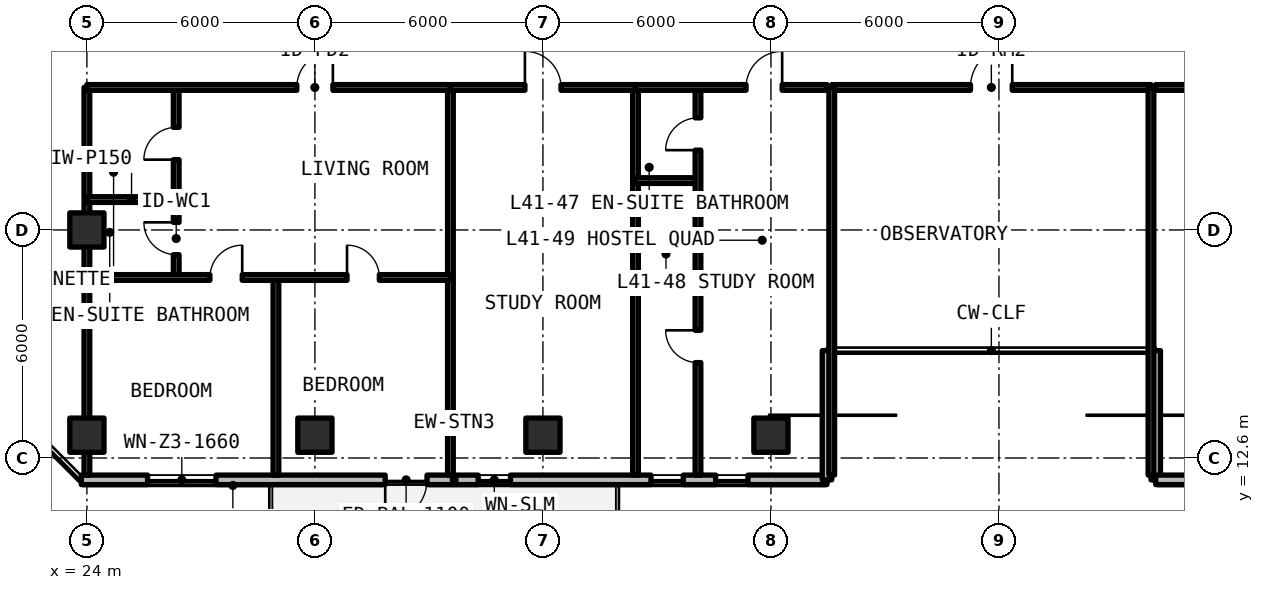
"""IFC4 building model, lengths in metres.
Left out: names, types, materials, properties, quantities, classifications, styles, units other than length and angle.
Written with IfcOpenShell. Run it as: python <this file> out.ifc"""

import sys

from ifc_helpers import new_model, si_unit, direction, frame, frame_2d, origin, origin_2d, place, context, subcontext, project, spatial, rectangle, extrude, element, fill, save


model = new_model("IFC4")
c1 = context("Model", 3, precision=1e-05, world=origin(), true_north=direction((0.0, 1.0)))
c2 = subcontext(c1, "Body", "Model", "MODEL_VIEW")
j1 = project(units=[si_unit("LENGTHUNIT", "METRE"), si_unit("PLANEANGLEUNIT", "RADIAN")], contexts=[c1])
p1 = place(None, origin())
s1 = spatial("IfcSite", under=j1, at=p1, CompositionType="ELEMENT")
p2 = place(p1, origin())
s2 = spatial("IfcBuilding", under=s1, at=p2, CompositionType="ELEMENT")
p3 = place(p2, frame((0.0, 0.0, 148.5)))
s3 = spatial("IfcBuildingStorey", under=s2, at=p3, CompositionType="ELEMENT", Elevation=148.5)
for number, where, z_axis, x_axis in (
    (1, (24.0, 18.6, 0.0), (0.0, 0.0, 1.0), (1.0, 0.0, 0.0)),
    (2, (24.0, 13.2, 0.0), (0.0, 0.0, 1.0), (1.0, 0.0, 0.0)),
    (3, (30.0, 13.2, 0.0), (0.0, 0.0, 1.0), (1.0, 0.0, 0.0)),
    (4, (36.0, 13.2, 0.0), (0.0, 0.0, 1.0), (1.0, 0.0, 0.0)),
    (5, (42.0, 13.2, 0.0), (0.0, 0.0, 1.0), (1.0, 0.0, 0.0)),
):
    element("IfcColumn", number, at=place(p3, frame(where, z_axis=z_axis, x_axis=x_axis)), inside=s3, PredefinedType="COLUMN", context=c2, shape_type="SweptSolid", body=[
        extrude(rectangle(XDim=0.9, YDim=0.9, at=origin_2d()), origin(), (0.0, 0.0, 1.0), 3.3),
    ])
p4 = place(p3, frame((23.852, 12.025, 0.0), z_axis=(0.0, 0.0, 1.0), x_axis=(1.0, 0.0, 0.0)))
e6 = element("IfcWall", 6, at=p4, inside=s3, PredefinedType="SOLIDWALL", context=c2, shape_type="SweptSolid", body=[
    extrude(rectangle(XDim=19.623, YDim=0.25, at=frame_2d((9.812, 0.0))), origin(), (0.0, 0.0, 1.0), 3.08),
])
p5 = place(p4, frame((7.998, 0.0, 0.0)))
e7 = element("IfcOpeningElement", 7, at=p5, cuts=e6, PredefinedType="OPENING", context=c2, shape_type="SweptSolid", body=[
    extrude(rectangle(XDim=1.1, YDim=2.15, at=frame_2d((0.55, 1.075))), frame((0.0, 0.135, 0.0), z_axis=(0.0, -1.0, 0.0), x_axis=(1.0, 0.0, 0.0)), (0.0, 0.0, 1.0), 0.27),
])
p6 = place(p4, frame((1.745, 0.0, 0.78)))
e8 = element("IfcOpeningElement", 8, at=p6, cuts=e6, PredefinedType="OPENING", context=c2, shape_type="SweptSolid", body=[
    extrude(rectangle(XDim=1.8, YDim=1.66, at=frame_2d((0.9, 0.83))), frame((0.0, 0.135, 0.0), z_axis=(0.0, -1.0, 0.0), x_axis=(1.0, 0.0, 0.0)), (0.0, 0.0, 1.0), 0.27),
])
p7 = place(p4, frame((10.444, 0.0, 0.78)))
e9 = element("IfcOpeningElement", 9, at=p7, cuts=e6, PredefinedType="OPENING", context=c2, shape_type="SweptSolid", body=[
    extrude(rectangle(XDim=0.85, YDim=1.65, at=frame_2d((0.425, 0.825))), frame((0.0, 0.135, 0.0), z_axis=(0.0, -1.0, 0.0), x_axis=(1.0, 0.0, 0.0)), (0.0, 0.0, 1.0), 0.27),
])
p8 = place(p4, frame((14.991, 0.0, 0.78)))
e10 = element("IfcOpeningElement", 10, at=p8, cuts=e6, PredefinedType="OPENING", context=c2, shape_type="SweptSolid", body=[
    extrude(rectangle(XDim=0.85, YDim=1.65, at=frame_2d((0.425, 0.825))), frame((0.0, 0.135, 0.0), z_axis=(0.0, -1.0, 0.0), x_axis=(1.0, 0.0, 0.0)), (0.0, 0.0, 1.0), 0.27),
])
p9 = place(p4, frame((16.693, 0.0, 0.78)))
e11 = element("IfcOpeningElement", 11, at=p9, cuts=e6, PredefinedType="OPENING", context=c2, shape_type="SweptSolid", body=[
    extrude(rectangle(XDim=0.85, YDim=1.65, at=frame_2d((0.425, 0.825))), frame((0.0, 0.135, 0.0), z_axis=(0.0, -1.0, 0.0), x_axis=(1.0, 0.0, 0.0)), (0.0, 0.0, 1.0), 0.27),
])
for number, where, z_axis, x_axis in (
    (12, (43.475, 12.025, 0.0), (0.0, 0.0, 1.0), (0.0, 1.0, 0.0)),
    (13, (52.125, 15.425, 0.0), (0.0, 0.0, 1.0), (0.0, -1.0, 0.0)),
):
    element("IfcWall", number, at=place(p3, frame(where, z_axis=z_axis, x_axis=x_axis)), inside=s3, PredefinedType="SOLIDWALL", context=c2, shape_type="SweptSolid", body=[
        extrude(rectangle(XDim=3.4, YDim=0.25, at=frame_2d((1.7, 0.0))), origin(), (0.0, 0.0, 1.0), 3.08),
    ])
p10 = place(p3, frame((52.125, 12.025, 0.0), z_axis=(0.0, 0.0, 1.0), x_axis=(1.0, 0.0, 0.0)))
e14 = element("IfcWall", 14, at=p10, inside=s3, PredefinedType="SOLIDWALL", context=c2, shape_type="SweptSolid", body=[
    extrude(rectangle(XDim=43.623, YDim=0.25, at=frame_2d((21.812, 0.0))), origin(), (0.0, 0.0, 1.0), 3.08),
])
p11 = place(p10, frame((15.775, 0.0, 0.0)))
e15 = element("IfcOpeningElement", 15, at=p11, cuts=e14, PredefinedType="OPENING", context=c2, shape_type="SweptSolid", body=[
    extrude(rectangle(XDim=1.1, YDim=2.15, at=frame_2d((0.55, 1.075))), frame((0.0, 0.135, 0.0), z_axis=(0.0, -1.0, 0.0), x_axis=(1.0, 0.0, 0.0)), (0.0, 0.0, 1.0), 0.27),
])
p12 = place(p10, frame((27.625, 0.0, 0.0)))
e16 = element("IfcOpeningElement", 16, at=p12, cuts=e14, PredefinedType="OPENING", context=c2, shape_type="SweptSolid", body=[
    extrude(rectangle(XDim=1.1, YDim=2.15, at=frame_2d((0.55, 1.075))), frame((0.0, 0.135, 0.0), z_axis=(0.0, -1.0, 0.0), x_axis=(1.0, 0.0, 0.0)), (0.0, 0.0, 1.0), 0.27),
])
p13 = place(p10, frame((2.669, 0.0, 0.78)))
e17 = element("IfcOpeningElement", 17, at=p13, cuts=e14, PredefinedType="OPENING", context=c2, shape_type="SweptSolid", body=[
    extrude(rectangle(XDim=1.8, YDim=1.66, at=frame_2d((0.9, 0.83))), frame((0.0, 0.135, 0.0), z_axis=(0.0, -1.0, 0.0), x_axis=(1.0, 0.0, 0.0)), (0.0, 0.0, 1.0), 0.27),
])
p14 = place(p10, frame((9.659, 0.0, 0.78)))
e18 = element("IfcOpeningElement", 18, at=p14, cuts=e14, PredefinedType="OPENING", context=c2, shape_type="SweptSolid", body=[
    extrude(rectangle(XDim=1.8, YDim=1.66, at=frame_2d((0.9, 0.83))), frame((0.0, 0.135, 0.0), z_axis=(0.0, -1.0, 0.0), x_axis=(1.0, 0.0, 0.0)), (0.0, 0.0, 1.0), 0.27),
])
p15 = place(p10, frame((32.888, 0.0, 0.78)))
e19 = element("IfcOpeningElement", 19, at=p15, cuts=e14, PredefinedType="OPENING", context=c2, shape_type="SweptSolid", body=[
    extrude(rectangle(XDim=1.8, YDim=1.66, at=frame_2d((0.9, 0.83))), frame((0.0, 0.135, 0.0), z_axis=(0.0, -1.0, 0.0), x_axis=(1.0, 0.0, 0.0)), (0.0, 0.0, 1.0), 0.27),
])
p16 = place(p10, frame((39.42, 0.0, 0.78)))
e20 = element("IfcOpeningElement", 20, at=p16, cuts=e14, PredefinedType="OPENING", context=c2, shape_type="SweptSolid", body=[
    extrude(rectangle(XDim=1.8, YDim=1.66, at=frame_2d((0.9, 0.83))), frame((0.0, 0.135, 0.0), z_axis=(0.0, -1.0, 0.0), x_axis=(1.0, 0.0, 0.0)), (0.0, 0.0, 1.0), 0.27),
])
p17 = place(p3, frame((43.6, 22.35, 0.0), z_axis=(0.0, 0.0, 1.0), x_axis=(1.0, 0.0, 0.0)))
e21 = element("IfcWall", 21, at=p17, inside=s3, PredefinedType="SOLIDWALL", context=c2, shape_type="SweptSolid", body=[
    extrude(rectangle(XDim=8.4, YDim=0.15, at=frame_2d((4.2, 0.0))), origin(), (0.0, 0.0, 1.0), 2.35),
])
p18 = place(p17, frame((3.65, 0.0, 0.0)))
e22 = element("IfcOpeningElement", 22, at=p18, cuts=e21, PredefinedType="OPENING", context=c2, shape_type="SweptSolid", body=[
    extrude(rectangle(XDim=1.1, YDim=2.15, at=frame_2d((0.55, 1.075))), frame((0.0, 0.085, 0.0), z_axis=(0.0, -1.0, 0.0), x_axis=(1.0, 0.0, 0.0)), (0.0, 0.0, 1.0), 0.17),
])
for number, where, z_axis, x_axis in (
    (23, (43.6, 12.15, 0.0), (0.0, 0.0, 1.0), (0.0, 1.0, 0.0)),
    (24, (52.0, 12.15, 0.0), (0.0, 0.0, 1.0), (0.0, 1.0, 0.0)),
    (25, (24.0, 12.15, 0.0), (0.0, 0.0, 1.0), (0.0, 1.0, 0.0)),
    (26, (33.566, 12.15, 0.0), (0.0, 0.0, 1.0), (0.0, 1.0, 0.0)),
):
    element("IfcWall", number, at=place(p3, frame(where, z_axis=z_axis, x_axis=x_axis)), inside=s3, PredefinedType="SOLIDWALL", context=c2, shape_type="SweptSolid", body=[
        extrude(rectangle(XDim=10.2, YDim=0.15, at=frame_2d((5.1, 0.0))), origin(), (0.0, 0.0, 1.0), 2.35),
    ])
p19 = place(p3, frame((24.0, 19.4, 0.0), z_axis=(0.0, 0.0, 1.0), x_axis=(1.0, 0.0, 0.0)))
e27 = element("IfcWall", 27, at=p19, inside=s3, PredefinedType="PARTITIONING", context=c2, shape_type="SweptSolid", body=[
    extrude(rectangle(XDim=2.35, YDim=0.15, at=frame_2d((1.175, 0.0))), origin(), (0.0, 0.0, 1.0), 2.35),
])
p20 = place(p3, frame((26.35, 17.35, 0.0), z_axis=(0.0, 0.0, 1.0), x_axis=(0.0, 1.0, 0.0)))
e28 = element("IfcWall", 28, at=p20, inside=s3, PredefinedType="PARTITIONING", context=c2, shape_type="SweptSolid", body=[
    extrude(rectangle(XDim=5.0, YDim=0.15, at=frame_2d((2.5, 0.0))), origin(), (0.0, 0.0, 1.0), 2.35),
])
p21 = place(p20, frame((0.6, 0.0, 0.0)))
e29 = element("IfcOpeningElement", 29, at=p21, cuts=e28, PredefinedType="OPENING", context=c2, shape_type="SweptSolid", body=[
    extrude(rectangle(XDim=0.85, YDim=2.1, at=frame_2d((0.425, 1.05))), frame((0.0, 0.085, 0.0), z_axis=(0.0, -1.0, 0.0), x_axis=(1.0, 0.0, 0.0)), (0.0, 0.0, 1.0), 0.17),
])
p22 = place(p20, frame((3.1, 0.0, 0.0)))
e30 = element("IfcOpeningElement", 30, at=p22, cuts=e28, PredefinedType="OPENING", context=c2, shape_type="SweptSolid", body=[
    extrude(rectangle(XDim=0.85, YDim=2.1, at=frame_2d((0.425, 1.05))), frame((0.0, 0.085, 0.0), z_axis=(0.0, -1.0, 0.0), x_axis=(1.0, 0.0, 0.0)), (0.0, 0.0, 1.0), 0.17),
])
p23 = place(p3, frame((28.974, 12.15, 0.0), z_axis=(0.0, 0.0, 1.0), x_axis=(0.0, 1.0, 0.0)))
e31 = element("IfcWall", 31, at=p23, inside=s3, PredefinedType="PARTITIONING", context=c2, shape_type="SweptSolid", body=[
    extrude(rectangle(XDim=5.2, YDim=0.15, at=frame_2d((2.6, 0.0))), origin(), (0.0, 0.0, 1.0), 2.35),
])
p24 = place(p3, frame((24.0, 17.35, 0.0), z_axis=(0.0, 0.0, 1.0), x_axis=(1.0, 0.0, 0.0)))
e32 = element("IfcWall", 32, at=p24, inside=s3, PredefinedType="PARTITIONING", context=c2, shape_type="SweptSolid", body=[
    extrude(rectangle(XDim=9.566, YDim=0.15, at=frame_2d((4.783, 0.0))), origin(), (0.0, 0.0, 1.0), 2.35),
])
p25 = place(p24, frame((3.237, 0.0, 0.0)))
e33 = element("IfcOpeningElement", 33, at=p25, cuts=e32, PredefinedType="OPENING", context=c2, shape_type="SweptSolid", body=[
    extrude(rectangle(XDim=0.85, YDim=2.1, at=frame_2d((0.425, 1.05))), frame((0.0, 0.085, 0.0), z_axis=(0.0, -1.0, 0.0), x_axis=(1.0, 0.0, 0.0)), (0.0, 0.0, 1.0), 0.17),
])
p26 = place(p24, frame((6.845, 0.0, 0.0)))
e34 = element("IfcOpeningElement", 34, at=p26, cuts=e32, PredefinedType="OPENING", context=c2, shape_type="SweptSolid", body=[
    extrude(rectangle(XDim=0.85, YDim=2.1, at=frame_2d((0.425, 1.05))), frame((0.0, 0.085, 0.0), z_axis=(0.0, -1.0, 0.0), x_axis=(1.0, 0.0, 0.0)), (0.0, 0.0, 1.0), 0.17),
])
p27 = place(p3, frame((24.0, 22.35, 0.0), z_axis=(0.0, 0.0, 1.0), x_axis=(1.0, 0.0, 0.0)))
e35 = element("IfcWall", 35, at=p27, inside=s3, PredefinedType="SOLIDWALL", context=c2, shape_type="SweptSolid", body=[
    extrude(rectangle(XDim=9.566, YDim=0.15, at=frame_2d((4.783, 0.0))), origin(), (0.0, 0.0, 1.0), 2.35),
])
p28 = place(p27, frame((5.523, 0.0, 0.0)))
e36 = element("IfcOpeningElement", 36, at=p28, cuts=e35, PredefinedType="OPENING", context=c2, shape_type="SweptSolid", body=[
    extrude(rectangle(XDim=0.95, YDim=2.15, at=frame_2d((0.475, 1.075))), frame((0.0, 0.085, 0.0), z_axis=(0.0, -1.0, 0.0), x_axis=(1.0, 0.0, 0.0)), (0.0, 0.0, 1.0), 0.17),
])
p29 = place(p3, frame((38.436, 12.15, 0.0), z_axis=(0.0, 0.0, 1.0), x_axis=(0.0, 1.0, 0.0)))
e37 = element("IfcWall", 37, at=p29, inside=s3, PredefinedType="SOLIDWALL", context=c2, shape_type="SweptSolid", body=[
    extrude(rectangle(XDim=10.2, YDim=0.15, at=frame_2d((5.1, 0.0))), origin(), (0.0, 0.0, 1.0), 2.35),
])
p30 = place(p3, frame((33.566, 22.35, 0.0), z_axis=(0.0, 0.0, 1.0), x_axis=(1.0, 0.0, 0.0)))
e38 = element("IfcWall", 38, at=p30, inside=s3, PredefinedType="SOLIDWALL", context=c2, shape_type="SweptSolid", body=[
    extrude(rectangle(XDim=4.87, YDim=0.15, at=frame_2d((2.435, 0.0))), origin(), (0.0, 0.0, 1.0), 2.35),
])
p31 = place(p30, frame((1.96, 0.0, 0.0)))
e39 = element("IfcOpeningElement", 39, at=p31, cuts=e38, PredefinedType="OPENING", context=c2, shape_type="SweptSolid", body=[
    extrude(rectangle(XDim=0.95, YDim=2.15, at=frame_2d((0.475, 1.075))), frame((0.0, 0.085, 0.0), z_axis=(0.0, -1.0, 0.0), x_axis=(1.0, 0.0, 0.0)), (0.0, 0.0, 1.0), 0.17),
])
p32 = place(p3, frame((38.436, 19.9, 0.0), z_axis=(0.0, 0.0, 1.0), x_axis=(1.0, 0.0, 0.0)))
e40 = element("IfcWall", 40, at=p32, inside=s3, PredefinedType="PARTITIONING", context=c2, shape_type="SweptSolid", body=[
    extrude(rectangle(XDim=1.644, YDim=0.15, at=frame_2d((0.822, 0.0))), origin(), (0.0, 0.0, 1.0), 2.35),
])
p33 = place(p3, frame((40.08, 12.15, 0.0), z_axis=(0.0, 0.0, 1.0), x_axis=(0.0, 1.0, 0.0)))
e41 = element("IfcWall", 41, at=p33, inside=s3, PredefinedType="PARTITIONING", context=c2, shape_type="SweptSolid", body=[
    extrude(rectangle(XDim=10.2, YDim=0.15, at=frame_2d((5.1, 0.0))), origin(), (0.0, 0.0, 1.0), 2.35),
])
p34 = place(p33, frame((2.96, 0.0, 0.0)))
e42 = element("IfcOpeningElement", 42, at=p34, cuts=e41, PredefinedType="OPENING", context=c2, shape_type="SweptSolid", body=[
    extrude(rectangle(XDim=0.85, YDim=2.1, at=frame_2d((0.425, 1.05))), frame((0.0, 0.085, 0.0), z_axis=(0.0, -1.0, 0.0), x_axis=(1.0, 0.0, 0.0)), (0.0, 0.0, 1.0), 0.17),
])
p35 = place(p33, frame((8.55, 0.0, 0.0)))
e43 = element("IfcOpeningElement", 43, at=p35, cuts=e41, PredefinedType="OPENING", context=c2, shape_type="SweptSolid", body=[
    extrude(rectangle(XDim=0.85, YDim=2.1, at=frame_2d((0.425, 1.05))), frame((0.0, 0.085, 0.0), z_axis=(0.0, -1.0, 0.0), x_axis=(1.0, 0.0, 0.0)), (0.0, 0.0, 1.0), 0.17),
])
p36 = place(p3, frame((38.436, 22.35, 0.0), z_axis=(0.0, 0.0, 1.0), x_axis=(1.0, 0.0, 0.0)))
e44 = element("IfcWall", 44, at=p36, inside=s3, PredefinedType="SOLIDWALL", context=c2, shape_type="SweptSolid", body=[
    extrude(rectangle(XDim=5.044, YDim=0.15, at=frame_2d((2.522, 0.0))), origin(), (0.0, 0.0, 1.0), 2.35),
])
p37 = place(p36, frame((2.909, 0.0, 0.0)))
e45 = element("IfcOpeningElement", 45, at=p37, cuts=e44, PredefinedType="OPENING", context=c2, shape_type="SweptSolid", body=[
    extrude(rectangle(XDim=0.95, YDim=2.15, at=frame_2d((0.475, 1.075))), frame((0.0, 0.085, 0.0), z_axis=(0.0, -1.0, 0.0), x_axis=(1.0, 0.0, 0.0)), (0.0, 0.0, 1.0), 0.17),
])
p38 = place(p3, frame((52.12, 22.35, 0.0), z_axis=(0.0, 0.0, 1.0), x_axis=(1.0, 0.0, 0.0)))
e46 = element("IfcWall", 46, at=p38, inside=s3, PredefinedType="SOLIDWALL", context=c2, shape_type="SweptSolid", body=[
    extrude(rectangle(XDim=7.147, YDim=0.15, at=frame_2d((3.574, 0.0))), origin(), (0.0, 0.0, 1.0), 2.35),
])
p39 = place(p38, frame((3.099, 0.0, 0.0)))
e47 = element("IfcOpeningElement", 47, at=p39, cuts=e46, PredefinedType="OPENING", context=c2, shape_type="SweptSolid", body=[
    extrude(rectangle(XDim=0.95, YDim=2.15, at=frame_2d((0.475, 1.075))), frame((0.0, 0.085, 0.0), z_axis=(0.0, -1.0, 0.0), x_axis=(1.0, 0.0, 0.0)), (0.0, 0.0, 1.0), 0.17),
])
p40 = place(p5, frame((1.1, 0.0, 0.0), z_axis=(0.0, 0.0, 1.0), x_axis=(-1.0, 0.0, 0.0)))
e48 = element("IfcDoor", 48, at=p40, inside=s3, OperationType="SINGLE_SWING_RIGHT", PredefinedType="DOOR", context=c2, shape_type="SweptSolid", body=[
    extrude(rectangle(XDim=1.1, YDim=2.15, at=frame_2d((0.55, 1.075))), frame((0.0, 0.025, 0.0), z_axis=(0.0, -1.0, 0.0), x_axis=(1.0, 0.0, 0.0)), (0.0, 0.0, 1.0), 0.05),
])
fill(e7, e48)
p41 = place(p6, origin())
e49 = element("IfcWindow", 49, at=p41, inside=s3, PartitioningType="SINGLE_PANEL", PredefinedType="WINDOW", context=c2, shape_type="SweptSolid", body=[
    extrude(rectangle(XDim=1.8, YDim=1.66, at=frame_2d((0.9, 0.83))), frame((0.0, 0.03, 0.0), z_axis=(0.0, -1.0, 0.0), x_axis=(1.0, 0.0, 0.0)), (0.0, 0.0, 1.0), 0.06),
])
fill(e8, e49)
p42 = place(p7, origin())
e50 = element("IfcWindow", 50, at=p42, inside=s3, PartitioningType="SINGLE_PANEL", PredefinedType="WINDOW", context=c2, shape_type="SweptSolid", body=[
    extrude(rectangle(XDim=0.85, YDim=1.65, at=frame_2d((0.425, 0.825))), frame((0.0, 0.03, 0.0), z_axis=(0.0, -1.0, 0.0), x_axis=(1.0, 0.0, 0.0)), (0.0, 0.0, 1.0), 0.06),
])
fill(e9, e50)
p43 = place(p8, origin())
e51 = element("IfcWindow", 51, at=p43, inside=s3, PartitioningType="SINGLE_PANEL", PredefinedType="WINDOW", context=c2, shape_type="SweptSolid", body=[
    extrude(rectangle(XDim=0.85, YDim=1.65, at=frame_2d((0.425, 0.825))), frame((0.0, 0.03, 0.0), z_axis=(0.0, -1.0, 0.0), x_axis=(1.0, 0.0, 0.0)), (0.0, 0.0, 1.0), 0.06),
])
fill(e10, e51)
p44 = place(p9, origin())
e52 = element("IfcWindow", 52, at=p44, inside=s3, PartitioningType="SINGLE_PANEL", PredefinedType="WINDOW", context=c2, shape_type="SweptSolid", body=[
    extrude(rectangle(XDim=0.85, YDim=1.65, at=frame_2d((0.425, 0.825))), frame((0.0, 0.03, 0.0), z_axis=(0.0, -1.0, 0.0), x_axis=(1.0, 0.0, 0.0)), (0.0, 0.0, 1.0), 0.06),
])
fill(e11, e52)
p45 = place(p18, origin())
e53 = element("IfcDoor", 53, at=p45, inside=s3, OperationType="SINGLE_SWING_RIGHT", PredefinedType="DOOR", context=c2, shape_type="SweptSolid", body=[
    extrude(rectangle(XDim=1.1, YDim=2.15, at=frame_2d((0.55, 1.075))), frame((0.0, 0.025, 0.0), z_axis=(0.0, -1.0, 0.0), x_axis=(1.0, 0.0, 0.0)), (0.0, 0.0, 1.0), 0.05),
])
fill(e22, e53)
p46 = place(p21, origin())
e54 = element("IfcDoor", 54, at=p46, inside=s3, OperationType="SINGLE_SWING_RIGHT", PredefinedType="DOOR", context=c2, shape_type="SweptSolid", body=[
    extrude(rectangle(XDim=0.85, YDim=2.1, at=frame_2d((0.425, 1.05))), frame((0.0, 0.025, 0.0), z_axis=(0.0, -1.0, 0.0), x_axis=(1.0, 0.0, 0.0)), (0.0, 0.0, 1.0), 0.05),
])
fill(e29, e54)
p47 = place(p22, origin())
e55 = element("IfcDoor", 55, at=p47, inside=s3, OperationType="SINGLE_SWING_LEFT", PredefinedType="DOOR", context=c2, shape_type="SweptSolid", body=[
    extrude(rectangle(XDim=0.85, YDim=2.1, at=frame_2d((0.425, 1.05))), frame((0.0, 0.025, 0.0), z_axis=(0.0, -1.0, 0.0), x_axis=(1.0, 0.0, 0.0)), (0.0, 0.0, 1.0), 0.05),
])
fill(e30, e55)
p48 = place(p25, origin())
e56 = element("IfcDoor", 56, at=p48, inside=s3, OperationType="SINGLE_SWING_RIGHT", PredefinedType="DOOR", context=c2, shape_type="SweptSolid", body=[
    extrude(rectangle(XDim=0.85, YDim=2.1, at=frame_2d((0.425, 1.05))), frame((0.0, 0.025, 0.0), z_axis=(0.0, -1.0, 0.0), x_axis=(1.0, 0.0, 0.0)), (0.0, 0.0, 1.0), 0.05),
])
fill(e33, e56)
p49 = place(p26, origin())
e57 = element("IfcDoor", 57, at=p49, inside=s3, OperationType="SINGLE_SWING_LEFT", PredefinedType="DOOR", context=c2, shape_type="SweptSolid", body=[
    extrude(rectangle(XDim=0.85, YDim=2.1, at=frame_2d((0.425, 1.05))), frame((0.0, 0.025, 0.0), z_axis=(0.0, -1.0, 0.0), x_axis=(1.0, 0.0, 0.0)), (0.0, 0.0, 1.0), 0.05),
])
fill(e34, e57)
p50 = place(p28, origin())
e58 = element("IfcDoor", 58, at=p50, inside=s3, OperationType="SINGLE_SWING_RIGHT", PredefinedType="DOOR", context=c2, shape_type="SweptSolid", body=[
    extrude(rectangle(XDim=0.95, YDim=2.15, at=frame_2d((0.475, 1.075))), frame((0.0, 0.025, 0.0), z_axis=(0.0, -1.0, 0.0), x_axis=(1.0, 0.0, 0.0)), (0.0, 0.0, 1.0), 0.05),
])
fill(e36, e58)
p51 = place(p31, origin())
e59 = element("IfcDoor", 59, at=p51, inside=s3, OperationType="SINGLE_SWING_LEFT", PredefinedType="DOOR", context=c2, shape_type="SweptSolid", body=[
    extrude(rectangle(XDim=0.95, YDim=2.15, at=frame_2d((0.475, 1.075))), frame((0.0, 0.025, 0.0), z_axis=(0.0, -1.0, 0.0), x_axis=(1.0, 0.0, 0.0)), (0.0, 0.0, 1.0), 0.05),
])
fill(e39, e59)
p52 = place(p34, origin())
e60 = element("IfcDoor", 60, at=p52, inside=s3, OperationType="SINGLE_SWING_RIGHT", PredefinedType="DOOR", context=c2, shape_type="SweptSolid", body=[
    extrude(rectangle(XDim=0.85, YDim=2.1, at=frame_2d((0.425, 1.05))), frame((0.0, 0.025, 0.0), z_axis=(0.0, -1.0, 0.0), x_axis=(1.0, 0.0, 0.0)), (0.0, 0.0, 1.0), 0.05),
])
fill(e42, e60)
p53 = place(p35, origin())
e61 = element("IfcDoor", 61, at=p53, inside=s3, OperationType="SINGLE_SWING_LEFT", PredefinedType="DOOR", context=c2, shape_type="SweptSolid", body=[
    extrude(rectangle(XDim=0.85, YDim=2.1, at=frame_2d((0.425, 1.05))), frame((0.0, 0.025, 0.0), z_axis=(0.0, -1.0, 0.0), x_axis=(1.0, 0.0, 0.0)), (0.0, 0.0, 1.0), 0.05),
])
fill(e43, e61)
p54 = place(p37, origin())
e62 = element("IfcDoor", 62, at=p54, inside=s3, OperationType="SINGLE_SWING_RIGHT", PredefinedType="DOOR", context=c2, shape_type="SweptSolid", body=[
    extrude(rectangle(XDim=0.95, YDim=2.15, at=frame_2d((0.475, 1.075))), frame((0.0, 0.025, 0.0), z_axis=(0.0, -1.0, 0.0), x_axis=(1.0, 0.0, 0.0)), (0.0, 0.0, 1.0), 0.05),
])
fill(e45, e62)
save(model, sys.argv[1])
